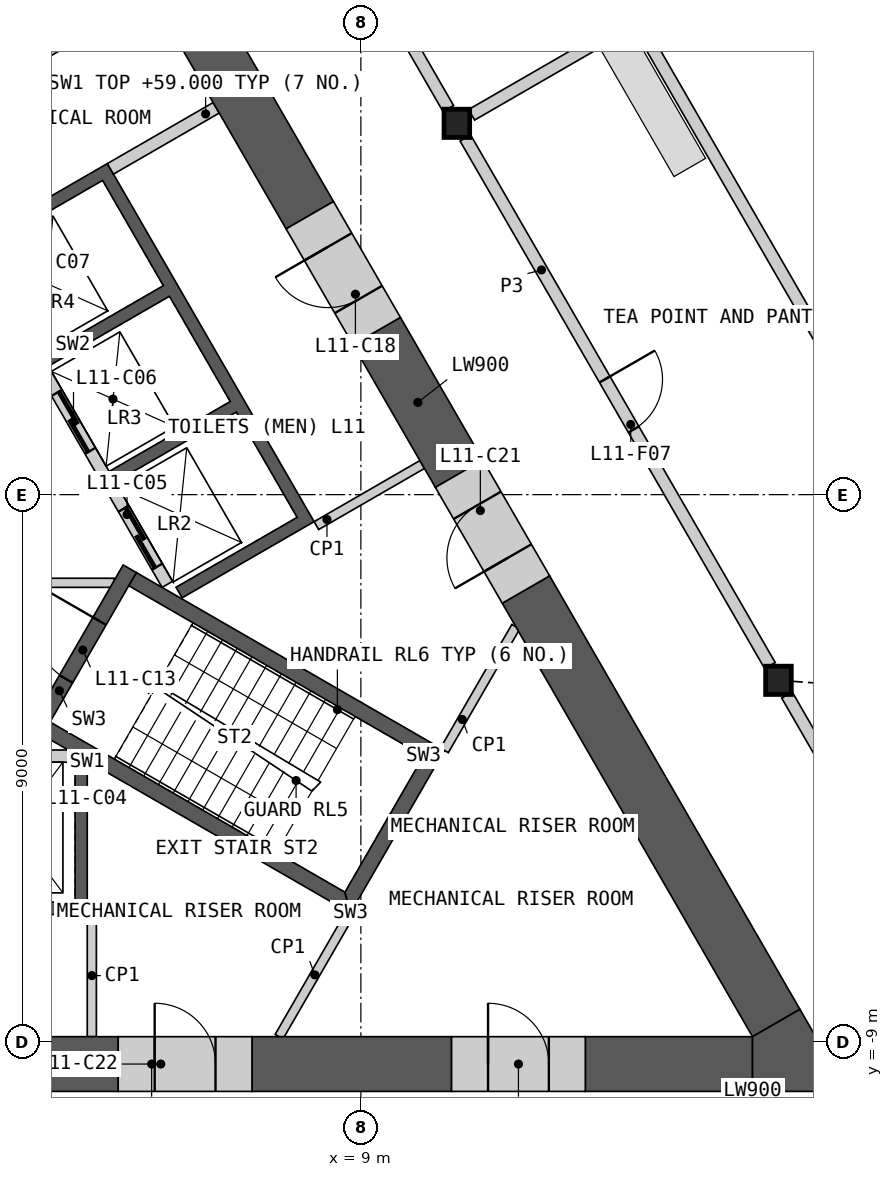
"""IFC4 building model, lengths in metres.
Left out: names, types, materials, properties, quantities, classifications, styles, units other than length and angle.
Written with IfcOpenShell. Run it as: python <this file> out.ifc"""

import sys

from ifc_helpers import new_model, si_unit, direction, frame, frame_2d, origin, origin_2d, place, context, subcontext, project, spatial, polyline, rectangle, i_section, outline, extrude, element, fill, save


model = new_model("IFC4")
c1 = context("Model", 3, precision=1e-05, world=origin(), true_north=direction((0.0, 1.0)))
c2 = subcontext(c1, "Body", "Model", "MODEL_VIEW")
j1 = project(units=[si_unit("LENGTHUNIT", "METRE"), si_unit("PLANEANGLEUNIT", "RADIAN")], contexts=[c1])
p1 = place(None, origin())
s1 = spatial("IfcSite", under=j1, at=p1, CompositionType="ELEMENT")
p2 = place(p1, origin())
s2 = spatial("IfcBuilding", under=s1, at=p2, CompositionType="ELEMENT")
p3 = place(p2, frame((0.0, 0.0, 55.2)))
s3 = spatial("IfcBuildingStorey", under=s2, at=p3, CompositionType="ELEMENT", Elevation=55.2)
for number, where, z_axis, x_axis in (
    (1, (15.868, -3.054, 0.0), (0.0, 0.0, 1.0), (1.0, 0.0, 0.0)),
    (2, (10.578, 6.107, 0.0), (0.0, 0.0, 1.0), (1.0, 0.0, 0.0)),
):
    element("IfcColumn", number, at=place(p3, frame(where, z_axis=z_axis, x_axis=x_axis)), inside=s3, PredefinedType="COLUMN", context=c2, shape_type="SweptSolid", body=[
        extrude(i_section(OverallWidth=0.421, OverallDepth=0.465, WebThickness=0.045, FlangeThickness=0.072, at=origin_2d()), origin(), (0.0, 0.0, 1.0), 4.2),
    ])
p4 = place(p3, origin())
e3 = element("IfcWall", 3, at=p4, inside=s3, PredefinedType="SHEAR", context=c2, shape_type="SweptSolid", body=[
    extrude(outline(polyline([(4.5, -4.4), (4.5, -6.906), (-4.5, -6.906), (-4.5, -4.4), (-4.3, -4.4), (-4.3, -6.7), (-2.3, -6.7), (-2.3, -4.4), (-2.1, -4.4), (-2.1, -6.7), (-0.1, -6.7), (-0.1, -4.4), (0.1, -4.4), (0.1, -6.7), (2.1, -6.7), (2.1, -4.4), (2.3, -4.4), (2.3, -6.7), (4.3, -6.7), (4.3, -4.4), (4.5, -4.4)])), origin(), (0.0, 0.0, 1.0), 3.8),
])
p5 = place(p3, frame((-4.187, -4.3, 0.0), z_axis=(0.0, 0.0, 1.0), x_axis=(1.0, 0.0, 0.0)))
e4 = element("IfcWall", 4, at=p5, inside=s3, PredefinedType="SOLIDWALL", context=c2, shape_type="SweptSolid", body=[
    extrude(rectangle(XDim=8.373, YDim=0.2, at=frame_2d((4.187, 0.0))), origin(), (0.0, 0.0, 1.0), 3.8),
])
p6 = place(p5, frame((0.287, 0.0, 0.0)))
e5 = element("IfcOpeningElement", 5, at=p6, cuts=e4, PredefinedType="OPENING", context=c2, shape_type="SweptSolid", body=[
    extrude(rectangle(XDim=1.2, YDim=2.1, at=frame_2d((0.6, 1.05))), frame((0.0, 0.11, 0.0), z_axis=(0.0, -1.0, 0.0), x_axis=(1.0, 0.0, 0.0)), (0.0, 0.0, 1.0), 0.22),
])
p7 = place(p5, frame((2.387, 0.0, 0.0)))
e6 = element("IfcOpeningElement", 6, at=p7, cuts=e4, PredefinedType="OPENING", context=c2, shape_type="SweptSolid", body=[
    extrude(rectangle(XDim=1.4, YDim=2.1, at=frame_2d((0.7, 1.05))), frame((0.0, 0.11, 0.0), z_axis=(0.0, -1.0, 0.0), x_axis=(1.0, 0.0, 0.0)), (0.0, 0.0, 1.0), 0.22),
])
p8 = place(p5, frame((4.737, 0.0, 0.0)))
e7 = element("IfcOpeningElement", 7, at=p8, cuts=e4, PredefinedType="OPENING", context=c2, shape_type="SweptSolid", body=[
    extrude(rectangle(XDim=1.1, YDim=2.1, at=frame_2d((0.55, 1.05))), frame((0.0, 0.11, 0.0), z_axis=(0.0, -1.0, 0.0), x_axis=(1.0, 0.0, 0.0)), (0.0, 0.0, 1.0), 0.22),
])
p9 = place(p5, frame((6.887, 0.0, 0.0)))
e8 = element("IfcOpeningElement", 8, at=p9, cuts=e4, PredefinedType="OPENING", context=c2, shape_type="SweptSolid", body=[
    extrude(rectangle(XDim=1.2, YDim=2.1, at=frame_2d((0.6, 1.05))), frame((0.0, 0.11, 0.0), z_axis=(0.0, -1.0, 0.0), x_axis=(1.0, 0.0, 0.0)), (0.0, 0.0, 1.0), 0.22),
])
p10 = place(p3, origin())
e9 = element("IfcWall", 9, at=p10, inside=s3, PredefinedType="SHEAR", context=c2, shape_type="SweptSolid", body=[
    extrude(outline(polyline([(2.66, 4.192), (4.831, 5.445), (8.231, -0.444), (6.061, -1.697), (5.96, -1.524), (7.952, -0.374), (6.952, 1.358), (4.96, 0.208), (4.861, 0.381), (6.852, 1.531), (5.852, 3.263), (3.861, 2.113), (3.76, 2.287), (5.752, 3.437), (4.752, 5.169), (2.76, 4.019), (2.66, 4.192)])), origin(), (0.0, 0.0, 1.0), 3.8),
])
p11 = place(p3, frame((5.817, -1.476, 0.0), z_axis=(0.0, 0.0, 1.0), x_axis=(-0.500002616675, 0.866023893041, 0.0)))
e10 = element("IfcWall", 10, at=p11, inside=s3, PredefinedType="SOLIDWALL", context=c2, shape_type="SweptSolid", body=[
    extrude(rectangle(XDim=8.373, YDim=0.2, at=frame_2d((4.187, 0.0))), origin(), (0.0, 0.0, 1.0), 3.8),
])
p12 = place(p11, frame((0.337, 0.0, 0.0)))
e11 = element("IfcOpeningElement", 11, at=p12, cuts=e10, PredefinedType="OPENING", context=c2, shape_type="SweptSolid", body=[
    extrude(rectangle(XDim=1.1, YDim=2.1, at=frame_2d((0.55, 1.05))), frame((0.0, 0.11, 0.0), z_axis=(0.0, -1.0, 0.0), x_axis=(1.0, 0.0, 0.0)), (0.0, 0.0, 1.0), 0.22),
])
p13 = place(p11, frame((2.537, 0.0, 0.0)))
e12 = element("IfcOpeningElement", 12, at=p13, cuts=e10, PredefinedType="OPENING", context=c2, shape_type="SweptSolid", body=[
    extrude(rectangle(XDim=1.1, YDim=2.1, at=frame_2d((0.55, 1.05))), frame((0.0, 0.11, 0.0), z_axis=(0.0, -1.0, 0.0), x_axis=(1.0, 0.0, 0.0)), (0.0, 0.0, 1.0), 0.22),
])
p14 = place(p11, frame((4.737, 0.0, 0.0)))
e13 = element("IfcOpeningElement", 13, at=p14, cuts=e10, PredefinedType="OPENING", context=c2, shape_type="SweptSolid", body=[
    extrude(rectangle(XDim=1.1, YDim=2.1, at=frame_2d((0.55, 1.05))), frame((0.0, 0.11, 0.0), z_axis=(0.0, -1.0, 0.0), x_axis=(1.0, 0.0, 0.0)), (0.0, 0.0, 1.0), 0.22),
])
p15 = place(p11, frame((7.037, 0.0, 0.0)))
e14 = element("IfcOpeningElement", 14, at=p15, cuts=e10, PredefinedType="OPENING", context=c2, shape_type="SweptSolid", body=[
    extrude(rectangle(XDim=0.9, YDim=2.1, at=frame_2d((0.45, 1.05))), frame((0.0, 0.11, 0.0), z_axis=(0.0, -1.0, 0.0), x_axis=(1.0, 0.0, 0.0)), (0.0, 0.0, 1.0), 0.22),
])
p16 = place(p3, frame((4.881, 5.358, 0.0), z_axis=(0.0, 0.0, 1.0), x_axis=(0.866035824272, 0.499981950752, 0.0)))
e15 = element("IfcWall", 15, at=p16, inside=s3, PredefinedType="SHEAR", context=c2, shape_type="SweptSolid", body=[
    extrude(rectangle(XDim=2.009, YDim=0.2, at=frame_2d((1.004, 0.0))), origin(), (0.0, 0.0, 1.0), 3.8),
])
p17 = place(p3, frame((3.781, 7.263, 0.0), z_axis=(0.0, 0.0, 1.0), x_axis=(0.865983199114, 0.50007309351, 0.0)))
e16 = element("IfcWall", 16, at=p17, inside=s3, PredefinedType="SHEAR", context=c2, shape_type="SweptSolid", body=[
    extrude(rectangle(XDim=2.009, YDim=0.2, at=frame_2d((1.004, 0.0))), origin(), (0.0, 0.0, 1.0), 3.8),
])
p18 = place(p3, frame((-4.941, -1.45, 0.0), z_axis=(0.0, 0.0, 1.0), x_axis=(1.0, 0.0, 0.0)))
e17 = element("IfcWall", 17, at=p18, inside=s3, PredefinedType="PARTITIONING", context=c2, shape_type="SweptSolid", body=[
    extrude(rectangle(XDim=9.882, YDim=0.15, at=frame_2d((4.941, 0.0))), origin(), (0.0, 0.0, 1.0), 3.8),
])
p19 = place(p18, frame((4.391, 0.0, 0.0)))
e18 = element("IfcOpeningElement", 18, at=p19, cuts=e17, PredefinedType="OPENING", context=c2, shape_type="SweptSolid", body=[
    extrude(rectangle(XDim=1.1, YDim=2.1, at=frame_2d((0.55, 1.05))), frame((0.0, 0.085, 0.0), z_axis=(0.0, -1.0, 0.0), x_axis=(1.0, 0.0, 0.0)), (0.0, 0.0, 1.0), 0.17),
])
p20 = place(p3, origin())
e19 = element("IfcWall", 19, at=p20, inside=s3, PredefinedType="SHEAR", context=c2, shape_type="SweptSolid", body=[
    extrude(outline(polyline([(3.763, -3.956), (8.83, -6.881), (8.738, -6.539), (3.888, -3.739), (3.763, -3.956)])), origin(), (0.0, 0.0, 1.0), 3.8),
])
p21 = place(p3, origin())
e20 = element("IfcWall", 20, at=p21, inside=s3, PredefinedType="SHEAR", context=c2, shape_type="SweptSolid", body=[
    extrude(outline(polyline([(8.83, -6.881), (10.374, -4.206), (10.032, -4.298), (8.738, -6.539), (8.83, -6.881)])), origin(), (0.0, 0.0, 1.0), 3.8),
])
p22 = place(p3, origin())
e21 = element("IfcWall", 21, at=p22, inside=s3, PredefinedType="SHEAR", context=c2, shape_type="SweptSolid", body=[
    extrude(outline(polyline([(10.032, -4.298), (10.374, -4.206), (5.307, -1.281), (5.182, -1.498), (10.032, -4.298)])), origin(), (0.0, 0.0, 1.0), 3.8),
])
p23 = place(p3, frame((3.655, -3.893, 0.0), z_axis=(0.0, 0.0, 1.0), x_axis=(0.499982516597, 0.866035497597, 0.0)))
e22 = element("IfcWall", 22, at=p23, inside=s3, PredefinedType="SHEAR", context=c2, shape_type="SweptSolid", body=[
    extrude(rectangle(XDim=3.088, YDim=0.25, at=frame_2d((1.544, 0.0))), origin(), (0.0, 0.0, 1.0), 3.8),
])
p24 = place(p23, frame((0.994, 0.0, 0.0)))
e23 = element("IfcOpeningElement", 23, at=p24, cuts=e22, PredefinedType="OPENING", context=c2, shape_type="SweptSolid", body=[
    extrude(rectangle(XDim=1.1, YDim=2.1, at=frame_2d((0.55, 1.05))), frame((0.0, 0.135, 0.0), z_axis=(0.0, -1.0, 0.0), x_axis=(1.0, 0.0, 0.0)), (0.0, 0.0, 1.0), 0.27),
])
p25 = place(p3, frame((4.575, -6.906, 0.0), z_axis=(0.0, 0.0, 1.0), x_axis=(0.0, -1.0, 0.0)))
e24 = element("IfcWall", 24, at=p25, inside=s3, PredefinedType="PARTITIONING", context=c2, shape_type="SweptSolid", body=[
    extrude(rectangle(XDim=2.009, YDim=0.15, at=frame_2d((1.004, 0.0))), origin(), (0.0, 0.0, 1.0), 3.8),
])
p26 = place(p3, frame((8.268, -0.509, 0.0), z_axis=(0.0, 0.0, 1.0), x_axis=(0.866035824272, 0.499981950752, 0.0)))
e25 = element("IfcWall", 25, at=p26, inside=s3, PredefinedType="PARTITIONING", context=c2, shape_type="SweptSolid", body=[
    extrude(rectangle(XDim=2.009, YDim=0.15, at=frame_2d((1.004, 0.0))), origin(), (0.0, 0.0, 1.0), 3.8),
])
p27 = place(p3, frame((8.83, -6.881, 0.0), z_axis=(0.0, 0.0, 1.0), x_axis=(-0.500073279432, -0.865983091751, 0.0)))
e26 = element("IfcWall", 26, at=p27, inside=s3, PredefinedType="PARTITIONING", context=c2, shape_type="SweptSolid", body=[
    extrude(rectangle(XDim=2.349, YDim=0.15, at=frame_2d((1.175, 0.0))), origin(), (0.0, 0.0, 1.0), 3.8),
])
p28 = place(p3, frame((10.374, -4.206, 0.0), z_axis=(0.0, 0.0, 1.0), x_axis=(0.499995339376, 0.86602809458, 0.0)))
e27 = element("IfcWall", 27, at=p28, inside=s3, PredefinedType="PARTITIONING", context=c2, shape_type="SweptSolid", body=[
    extrude(rectangle(XDim=2.349, YDim=0.15, at=frame_2d((1.175, 0.0))), origin(), (0.0, 0.0, 1.0), 3.8),
])
p29 = place(p3, frame((1.1, -9.365, 0.0), z_axis=(0.0, 0.0, 1.0), x_axis=(1.0, 0.0, 0.0)))
e28 = element("IfcWall", 28, at=p29, inside=s3, PredefinedType="SHEAR", context=c2, shape_type="SweptSolid", body=[
    extrude(rectangle(XDim=3.909, YDim=0.9, at=frame_2d((1.955, 0.0))), origin(), (0.0, 0.0, 1.0), 3.8),
])
p30 = place(p3, frame((7.209, -9.365, 0.0), z_axis=(0.0, 0.0, 1.0), x_axis=(1.0, 0.0, 0.0)))
e29 = element("IfcWall", 29, at=p30, inside=s3, PredefinedType="SHEAR", context=c2, shape_type="SweptSolid", body=[
    extrude(rectangle(XDim=3.282, YDim=0.9, at=frame_2d((1.641, 0.0))), origin(), (0.0, 0.0, 1.0), 3.8),
])
p31 = place(p3, frame((12.691, -9.365, 0.0), z_axis=(0.0, 0.0, 1.0), x_axis=(1.0, 0.0, 0.0)))
e30 = element("IfcWall", 30, at=p31, inside=s3, PredefinedType="SHEAR", context=c2, shape_type="SweptSolid", body=[
    extrude(rectangle(XDim=2.75, YDim=0.9, at=frame_2d((1.375, 0.0))), origin(), (0.0, 0.0, 1.0), 3.8),
])
p32 = place(p3, frame((8.16, 4.596, 0.0), z_axis=(0.0, 0.0, 1.0), x_axis=(-0.500009830349, 0.866019728156, 0.0)))
e31 = element("IfcWall", 31, at=p32, inside=s3, PredefinedType="SHEAR", context=c2, shape_type="SweptSolid", body=[
    extrude(rectangle(XDim=15.541, YDim=0.9, at=frame_2d((7.771, 0.0))), origin(), (0.0, 0.0, 1.0), 3.8),
])
p33 = place(p3, frame((15.831, -8.69, 0.0), z_axis=(0.0, 0.0, 1.0), x_axis=(-0.499995435471, 0.8660280391, 0.0)))
e32 = element("IfcWall", 32, at=p33, inside=s3, PredefinedType="SHEAR", context=c2, shape_type="SweptSolid", body=[
    extrude(rectangle(XDim=8.232, YDim=0.9, at=frame_2d((4.116, 0.0))), origin(), (0.0, 0.0, 1.0), 3.8),
])
p34 = place(p3, frame((10.615, 0.344, 0.0), z_axis=(0.0, 0.0, 1.0), x_axis=(-0.500044870432, 0.865999496279, 0.0)))
e33 = element("IfcWall", 33, at=p34, inside=s3, PredefinedType="SHEAR", context=c2, shape_type="SweptSolid", body=[
    extrude(rectangle(XDim=2.709, YDim=0.9, at=frame_2d((1.354, 0.0))), origin(), (0.0, 0.0, 1.0), 3.8),
])
p35 = place(p3, origin())
e34 = element("IfcWall", 34, at=p35, inside=s3, PredefinedType="SHEAR", context=c2, shape_type="SweptSolid", body=[
    extrude(outline(polyline([(15.441, -9.815), (15.441, -8.915), (16.221, -8.465), (17.0, -9.815), (15.441, -9.815)])), origin(), (0.0, 0.0, 1.0), 3.8),
])
p36 = place(p3, frame((10.491, -9.365, 0.0), z_axis=(0.0, 0.0, 1.0), x_axis=(1.0, 0.0, 0.0)))
e35 = element("IfcWall", 35, at=p36, inside=s3, PredefinedType="SHEAR", context=c2, shape_type="SweptSolid", body=[
    extrude(rectangle(XDim=2.2, YDim=0.9, at=frame_2d((1.1, 0.0))), origin(), (0.0, 0.0, 1.0), 3.8),
])
p37 = place(p36, frame((0.6, 0.0, 0.0)))
e36 = element("IfcOpeningElement", 36, at=p37, cuts=e35, PredefinedType="OPENING", context=c2, shape_type="SweptSolid", body=[
    extrude(rectangle(XDim=1.0, YDim=2.1, at=frame_2d((0.5, 1.05))), frame((0.0, 0.46, 0.0), z_axis=(0.0, -1.0, 0.0), x_axis=(1.0, 0.0, 0.0)), (0.0, 0.0, 1.0), 0.92),
])
p38 = place(p3, frame((9.26, 2.691, 0.0), z_axis=(0.0, 0.0, 1.0), x_axis=(-0.499946605688, 0.86605622881, 0.0)))
e37 = element("IfcWall", 37, at=p38, inside=s3, PredefinedType="SHEAR", context=c2, shape_type="SweptSolid", body=[
    extrude(rectangle(XDim=2.2, YDim=0.9, at=frame_2d((1.1, 0.0))), origin(), (0.0, 0.0, 1.0), 3.8),
])
p39 = place(p38, frame((0.6, 0.0, 0.0)))
e38 = element("IfcOpeningElement", 38, at=p39, cuts=e37, PredefinedType="OPENING", context=c2, shape_type="SweptSolid", body=[
    extrude(rectangle(XDim=1.0, YDim=2.1, at=frame_2d((0.5, 1.05))), frame((0.0, 0.46, 0.0), z_axis=(0.0, -1.0, 0.0), x_axis=(1.0, 0.0, 0.0)), (0.0, 0.0, 1.0), 0.92),
])
p40 = place(p3, frame((11.715, -1.561, 0.0), z_axis=(0.0, 0.0, 1.0), x_axis=(-0.499946605688, 0.86605622881, 0.0)))
e39 = element("IfcWall", 39, at=p40, inside=s3, PredefinedType="SHEAR", context=c2, shape_type="SweptSolid", body=[
    extrude(rectangle(XDim=2.2, YDim=0.9, at=frame_2d((1.1, 0.0))), origin(), (0.0, 0.0, 1.0), 3.8),
])
p41 = place(p40, frame((0.6, 0.0, 0.0)))
e40 = element("IfcOpeningElement", 40, at=p41, cuts=e39, PredefinedType="OPENING", context=c2, shape_type="SweptSolid", body=[
    extrude(rectangle(XDim=1.0, YDim=2.1, at=frame_2d((0.5, 1.05))), frame((0.0, 0.46, 0.0), z_axis=(0.0, -1.0, 0.0), x_axis=(1.0, 0.0, 0.0)), (0.0, 0.0, 1.0), 0.92),
])
p42 = place(p3, frame((5.009, -9.365, 0.0), z_axis=(0.0, 0.0, 1.0), x_axis=(1.0, 0.0, 0.0)))
e41 = element("IfcWall", 41, at=p42, inside=s3, PredefinedType="SHEAR", context=c2, shape_type="SweptSolid", body=[
    extrude(rectangle(XDim=2.2, YDim=0.9, at=frame_2d((1.1, 0.0))), origin(), (0.0, 0.0, 1.0), 3.8),
])
p43 = place(p42, frame((0.6, 0.0, 0.0)))
e42 = element("IfcOpeningElement", 42, at=p43, cuts=e41, PredefinedType="OPENING", context=c2, shape_type="SweptSolid", body=[
    extrude(rectangle(XDim=1.0, YDim=2.1, at=frame_2d((0.5, 1.05))), frame((0.0, 0.46, 0.0), z_axis=(0.0, -1.0, 0.0), x_axis=(1.0, 0.0, 0.0)), (0.0, 0.0, 1.0), 0.92),
])
p44 = place(p3, frame((5.429, 15.026, 0.0), z_axis=(0.0, 0.0, 1.0), x_axis=(0.50001002959, -0.86601961312, 0.0)))
e43 = element("IfcWall", 43, at=p44, inside=s3, PredefinedType="PARTITIONING", context=c2, shape_type="SweptSolid", body=[
    extrude(rectangle(XDim=10.019, YDim=0.2, at=frame_2d((5.009, 0.0))), origin(), (0.0, 0.0, 1.0), 3.8),
])
p45 = place(p44, frame((4.059, 0.0, 0.0)))
e44 = element("IfcOpeningElement", 44, at=p45, cuts=e43, PredefinedType="OPENING", context=c2, shape_type="SweptSolid", body=[
    extrude(rectangle(XDim=1.8, YDim=2.1, at=frame_2d((0.9, 1.05))), frame((0.0, 0.11, 0.0), z_axis=(0.0, -1.0, 0.0), x_axis=(1.0, 0.0, 0.0)), (0.0, 0.0, 1.0), 0.22),
])
p46 = place(p3, frame((10.719, 5.865, 0.0), z_axis=(0.0, 0.0, 1.0), x_axis=(0.49999175339, -0.866030164915, 0.0)))
e45 = element("IfcWall", 45, at=p46, inside=s3, PredefinedType="PARTITIONING", context=c2, shape_type="SweptSolid", body=[
    extrude(rectangle(XDim=10.019, YDim=0.2, at=frame_2d((5.009, 0.0))), origin(), (0.0, 0.0, 1.0), 3.8),
])
p47 = place(p46, frame((4.585, 0.0, 0.0)))
e46 = element("IfcOpeningElement", 46, at=p47, cuts=e45, PredefinedType="OPENING", context=c2, shape_type="SweptSolid", body=[
    extrude(rectangle(XDim=0.95, YDim=2.1, at=frame_2d((0.475, 1.05))), frame((0.0, 0.11, 0.0), z_axis=(0.0, -1.0, 0.0), x_axis=(1.0, 0.0, 0.0)), (0.0, 0.0, 1.0), 0.22),
])
p48 = place(p3, frame((16.008, -3.296, 0.0), z_axis=(0.0, 0.0, 1.0), x_axis=(0.499984737558, -0.86603421538, 0.0)))
e47 = element("IfcWall", 47, at=p48, inside=s3, PredefinedType="PARTITIONING", context=c2, shape_type="SweptSolid", body=[
    extrude(rectangle(XDim=6.473, YDim=0.2, at=frame_2d((3.236, 0.0))), origin(), (0.0, 0.0, 1.0), 3.8),
])
p49 = place(p3, frame((13.573, 7.721, 0.0), z_axis=(0.0, 0.0, 1.0), x_axis=(0.499990262232, -0.866031025814, 0.0)))
e48 = element("IfcWall", 48, at=p49, inside=s3, PredefinedType="PARTITIONING", context=c2, shape_type="SweptSolid", body=[
    extrude(rectangle(XDim=17.597, YDim=0.2, at=frame_2d((8.799, 0.0))), origin(), (0.0, 0.0, 1.0), 2.885),
])
p50 = place(p49, frame((9.277, 0.0, 0.0)))
e49 = element("IfcOpeningElement", 49, at=p50, cuts=e48, PredefinedType="OPENING", context=c2, shape_type="SweptSolid", body=[
    extrude(rectangle(XDim=0.95, YDim=2.1, at=frame_2d((0.475, 1.05))), frame((0.0, 0.11, 0.0), z_axis=(0.0, -1.0, 0.0), x_axis=(1.0, 0.0, 0.0)), (0.0, 0.0, 1.0), 0.22),
])
p51 = place(p3, frame((10.821, 6.247, 0.0), z_axis=(0.0, 0.0, 1.0), x_axis=(0.866026729935, 0.499997703033, 0.0)))
e50 = element("IfcWall", 50, at=p51, inside=s3, PredefinedType="PARTITIONING", context=c2, shape_type="SweptSolid", body=[
    extrude(rectangle(XDim=12.848, YDim=0.2, at=frame_2d((6.424, 0.0))), origin(), (0.0, 0.0, 1.0), 2.885),
])
p52 = place(p12, origin())
e51 = element("IfcDoor", 51, at=p52, inside=s3, OperationType="SLIDING_TO_LEFT", PredefinedType="DOOR", context=c2, shape_type="SweptSolid", body=[
    extrude(rectangle(XDim=1.1, YDim=2.1, at=frame_2d((0.55, 1.05))), frame((0.0, 0.025, 0.0), z_axis=(0.0, -1.0, 0.0), x_axis=(1.0, 0.0, 0.0)), (0.0, 0.0, 1.0), 0.05),
])
fill(e11, e51)
p53 = place(p13, origin())
e52 = element("IfcDoor", 52, at=p53, inside=s3, OperationType="SLIDING_TO_LEFT", PredefinedType="DOOR", context=c2, shape_type="SweptSolid", body=[
    extrude(rectangle(XDim=1.1, YDim=2.1, at=frame_2d((0.55, 1.05))), frame((0.0, 0.025, 0.0), z_axis=(0.0, -1.0, 0.0), x_axis=(1.0, 0.0, 0.0)), (0.0, 0.0, 1.0), 0.05),
])
fill(e12, e52)
p54 = place(p24, origin())
e53 = element("IfcDoor", 53, at=p54, inside=s3, OperationType="SINGLE_SWING_RIGHT", PredefinedType="DOOR", context=c2, shape_type="SweptSolid", body=[
    extrude(rectangle(XDim=1.1, YDim=2.1, at=frame_2d((0.55, 1.05))), frame((0.0, 0.025, 0.0), z_axis=(0.0, -1.0, 0.0), x_axis=(1.0, 0.0, 0.0)), (0.0, 0.0, 1.0), 0.05),
])
fill(e23, e53)
p55 = place(p37, origin())
e54 = element("IfcDoor", 54, at=p55, inside=s3, OperationType="SINGLE_SWING_LEFT", PredefinedType="DOOR", context=c2, shape_type="SweptSolid", body=[
    extrude(rectangle(XDim=1.0, YDim=2.1, at=frame_2d((0.5, 1.05))), frame((0.0, 0.205, 0.0), z_axis=(0.0, -1.0, 0.0), x_axis=(1.0, 0.0, 0.0)), (0.0, 0.0, 1.0), 0.05),
])
fill(e36, e54)
p56 = place(p39, origin())
e55 = element("IfcDoor", 55, at=p56, inside=s3, OperationType="SINGLE_SWING_RIGHT", PredefinedType="DOOR", context=c2, shape_type="SweptSolid", body=[
    extrude(rectangle(XDim=1.0, YDim=2.1, at=frame_2d((0.5, 1.05))), frame((0.0, 0.205, 0.0), z_axis=(0.0, -1.0, 0.0), x_axis=(1.0, 0.0, 0.0)), (0.0, 0.0, 1.0), 0.05),
])
fill(e38, e55)
p57 = place(p41, origin())
e56 = element("IfcDoor", 56, at=p57, inside=s3, OperationType="SINGLE_SWING_LEFT", PredefinedType="DOOR", context=c2, shape_type="SweptSolid", body=[
    extrude(rectangle(XDim=1.0, YDim=2.1, at=frame_2d((0.5, 1.05))), frame((0.0, 0.205, 0.0), z_axis=(0.0, -1.0, 0.0), x_axis=(1.0, 0.0, 0.0)), (0.0, 0.0, 1.0), 0.05),
])
fill(e40, e56)
p58 = place(p43, origin())
e57 = element("IfcDoor", 57, at=p58, inside=s3, OperationType="SINGLE_SWING_LEFT", PredefinedType="DOOR", context=c2, shape_type="SweptSolid", body=[
    extrude(rectangle(XDim=1.0, YDim=2.1, at=frame_2d((0.5, 1.05))), frame((0.0, 0.205, 0.0), z_axis=(0.0, -1.0, 0.0), x_axis=(1.0, 0.0, 0.0)), (0.0, 0.0, 1.0), 0.05),
])
fill(e42, e57)
p59 = place(p47, origin())
e58 = element("IfcDoor", 58, at=p59, inside=s3, OperationType="SINGLE_SWING_LEFT", PredefinedType="DOOR", context=c2, shape_type="SweptSolid", body=[
    extrude(rectangle(XDim=0.95, YDim=2.1, at=frame_2d((0.475, 1.05))), frame((0.0, 0.025, 0.0), z_axis=(0.0, -1.0, 0.0), x_axis=(1.0, 0.0, 0.0)), (0.0, 0.0, 1.0), 0.05),
])
fill(e46, e58)
save(model, sys.argv[1])
